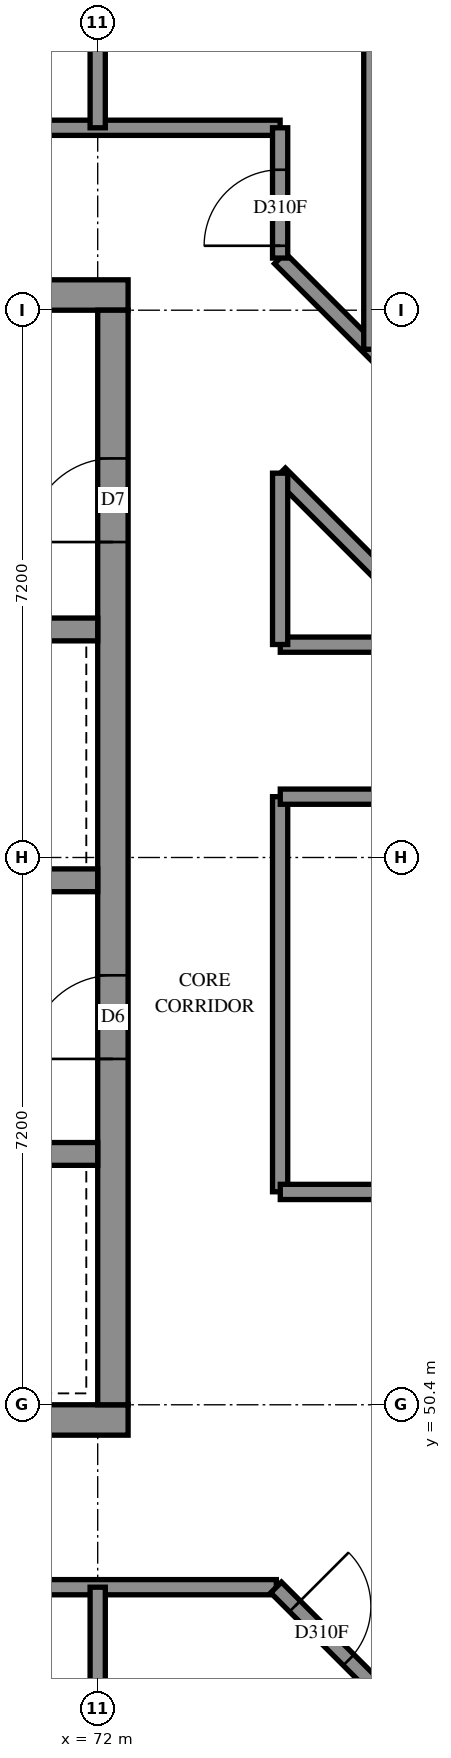
"""IFC4 building model, lengths in metres.
Left out: names, types, materials, properties, quantities, classifications, styles, units other than length and angle.
Written with IfcOpenShell. Run it as: python <this file> out.ifc"""

import sys

from ifc_helpers import new_model, si_unit, direction, frame, frame_2d, origin, place, context, subcontext, project, spatial, rectangle, extrude, element, fill, save


model = new_model("IFC4")
c1 = context("Model", 3, precision=1e-05, world=origin(), true_north=direction((0.0, 1.0)))
c2 = subcontext(c1, "Body", "Model", "MODEL_VIEW")
j1 = project(units=[si_unit("LENGTHUNIT", "METRE"), si_unit("PLANEANGLEUNIT", "RADIAN")], contexts=[c1])
p1 = place(None, origin())
s1 = spatial("IfcSite", under=j1, at=p1, CompositionType="ELEMENT")
p2 = place(p1, origin())
s2 = spatial("IfcBuilding", under=s1, at=p2, CompositionType="ELEMENT")
p3 = place(p2, frame((0.0, 0.0, 257.4)))
s3 = spatial("IfcBuildingStorey", under=s2, at=p3, CompositionType="ELEMENT", Elevation=257.4)
p4 = place(p3, frame((57.2, 50.2, -0.3), z_axis=(0.0, 0.0, 1.0), x_axis=(1.0, 0.0, 0.0)))
e1 = element("IfcWall", 1, at=p4, inside=s3, PredefinedType="SHEAR", context=c2, shape_type="SweptSolid", body=[
    extrude(rectangle(XDim=15.2, YDim=0.4, at=frame_2d((7.6, 0.0))), origin(), (0.0, 0.0, 1.0), 2.7),
])
p5 = place(p3, frame((57.2, 65.0, -0.3), z_axis=(0.0, 0.0, 1.0), x_axis=(1.0, 0.0, 0.0)))
e2 = element("IfcWall", 2, at=p5, inside=s3, PredefinedType="SHEAR", context=c2, shape_type="SweptSolid", body=[
    extrude(rectangle(XDim=15.2, YDim=0.4, at=frame_2d((7.6, 0.0))), origin(), (0.0, 0.0, 1.0), 2.7),
])
p6 = place(p5, frame((10.4, 0.0, 0.3)))
e3 = element("IfcOpeningElement", 3, at=p6, cuts=e2, PredefinedType="OPENING", context=c2, shape_type="SweptSolid", body=[
    extrude(rectangle(XDim=0.8, YDim=2.1, at=frame_2d((0.4, 1.05))), frame((0.0, 0.21, 0.0), z_axis=(0.0, -1.0, 0.0), x_axis=(1.0, 0.0, 0.0)), (0.0, 0.0, 1.0), 0.42),
])
p7 = place(p3, frame((72.2, 50.4, -0.3), z_axis=(0.0, 0.0, 1.0), x_axis=(0.0, 1.0, 0.0)))
e4 = element("IfcWall", 4, at=p7, inside=s3, PredefinedType="SHEAR", context=c2, shape_type="SweptSolid", body=[
    extrude(rectangle(XDim=14.4, YDim=0.4, at=frame_2d((7.2, 0.0))), origin(), (0.0, 0.0, 1.0), 2.7),
])
p8 = place(p7, frame((4.55, 0.0, 0.3)))
e5 = element("IfcOpeningElement", 5, at=p8, cuts=e4, PredefinedType="OPENING", context=c2, shape_type="SweptSolid", body=[
    extrude(rectangle(XDim=1.1, YDim=2.1, at=frame_2d((0.55, 1.05))), frame((0.0, 0.21, 0.0), z_axis=(0.0, -1.0, 0.0), x_axis=(1.0, 0.0, 0.0)), (0.0, 0.0, 1.0), 0.42),
])
p9 = place(p7, frame((11.35, 0.0, 0.3)))
e6 = element("IfcOpeningElement", 6, at=p9, cuts=e4, PredefinedType="OPENING", context=c2, shape_type="SweptSolid", body=[
    extrude(rectangle(XDim=1.1, YDim=2.1, at=frame_2d((0.55, 1.05))), frame((0.0, 0.21, 0.0), z_axis=(0.0, -1.0, 0.0), x_axis=(1.0, 0.0, 0.0)), (0.0, 0.0, 1.0), 0.42),
])
p10 = place(p3, frame((57.6, 53.7, 0.0), z_axis=(0.0, 0.0, 1.0), x_axis=(1.0, 0.0, 0.0)))
e7 = element("IfcWall", 7, at=p10, inside=s3, PredefinedType="SOLIDWALL", context=c2, shape_type="SweptSolid", body=[
    extrude(rectangle(XDim=14.4, YDim=0.3, at=frame_2d((7.2, 0.0))), origin(), (0.0, 0.0, 1.0), 3.1),
])
p11 = place(p10, frame((1.35, 0.0, 0.0)))
e8 = element("IfcOpeningElement", 8, at=p11, cuts=e7, PredefinedType="OPENING", context=c2, shape_type="SweptSolid", body=[
    extrude(rectangle(XDim=0.9, YDim=2.1, at=frame_2d((0.45, 1.05))), frame((0.0, 0.16, 0.0), z_axis=(0.0, -1.0, 0.0), x_axis=(1.0, 0.0, 0.0)), (0.0, 0.0, 1.0), 0.32),
])
p12 = place(p10, frame((4.95, 0.0, 0.0)))
e9 = element("IfcOpeningElement", 9, at=p12, cuts=e7, PredefinedType="OPENING", context=c2, shape_type="SweptSolid", body=[
    extrude(rectangle(XDim=0.9, YDim=2.1, at=frame_2d((0.45, 1.05))), frame((0.0, 0.16, 0.0), z_axis=(0.0, -1.0, 0.0), x_axis=(1.0, 0.0, 0.0)), (0.0, 0.0, 1.0), 0.32),
])
p13 = place(p10, frame((8.55, 0.0, 0.0)))
e10 = element("IfcOpeningElement", 10, at=p13, cuts=e7, PredefinedType="OPENING", context=c2, shape_type="SweptSolid", body=[
    extrude(rectangle(XDim=0.9, YDim=2.1, at=frame_2d((0.45, 1.05))), frame((0.0, 0.16, 0.0), z_axis=(0.0, -1.0, 0.0), x_axis=(1.0, 0.0, 0.0)), (0.0, 0.0, 1.0), 0.32),
])
p14 = place(p10, frame((12.05, 0.0, 0.0)))
e11 = element("IfcOpeningElement", 11, at=p14, cuts=e7, PredefinedType="OPENING", context=c2, shape_type="SweptSolid", body=[
    extrude(rectangle(XDim=1.1, YDim=2.1, at=frame_2d((0.55, 1.05))), frame((0.0, 0.16, 0.0), z_axis=(0.0, -1.0, 0.0), x_axis=(1.0, 0.0, 0.0)), (0.0, 0.0, 1.0), 0.32),
])
p15 = place(p3, frame((57.6, 57.3, 0.0), z_axis=(0.0, 0.0, 1.0), x_axis=(1.0, 0.0, 0.0)))
e12 = element("IfcWall", 12, at=p15, inside=s3, PredefinedType="SOLIDWALL", context=c2, shape_type="SweptSolid", body=[
    extrude(rectangle(XDim=14.4, YDim=0.3, at=frame_2d((7.2, 0.0))), origin(), (0.0, 0.0, 1.0), 3.1),
])
p16 = place(p15, frame((8.55, 0.0, 0.0)))
e13 = element("IfcOpeningElement", 13, at=p16, cuts=e12, PredefinedType="OPENING", context=c2, shape_type="SweptSolid", body=[
    extrude(rectangle(XDim=0.9, YDim=2.1, at=frame_2d((0.45, 1.05))), frame((0.0, 0.16, 0.0), z_axis=(0.0, -1.0, 0.0), x_axis=(1.0, 0.0, 0.0)), (0.0, 0.0, 1.0), 0.32),
])
p17 = place(p15, frame((1.25, 0.0, 0.0)))
e14 = element("IfcOpeningElement", 14, at=p17, cuts=e12, PredefinedType="OPENING", context=c2, shape_type="SweptSolid", body=[
    extrude(rectangle(XDim=1.1, YDim=2.1, at=frame_2d((0.55, 1.05))), frame((0.0, 0.16, 0.0), z_axis=(0.0, -1.0, 0.0), x_axis=(1.0, 0.0, 0.0)), (0.0, 0.0, 1.0), 0.32),
])
p18 = place(p15, frame((4.85, 0.0, 0.0)))
e15 = element("IfcOpeningElement", 15, at=p18, cuts=e12, PredefinedType="OPENING", context=c2, shape_type="SweptSolid", body=[
    extrude(rectangle(XDim=1.1, YDim=2.1, at=frame_2d((0.55, 1.05))), frame((0.0, 0.16, 0.0), z_axis=(0.0, -1.0, 0.0), x_axis=(1.0, 0.0, 0.0)), (0.0, 0.0, 1.0), 0.32),
])
p19 = place(p15, frame((12.05, 0.0, 0.0)))
e16 = element("IfcOpeningElement", 16, at=p19, cuts=e12, PredefinedType="OPENING", context=c2, shape_type="SweptSolid", body=[
    extrude(rectangle(XDim=1.1, YDim=2.1, at=frame_2d((0.55, 1.05))), frame((0.0, 0.16, 0.0), z_axis=(0.0, -1.0, 0.0), x_axis=(1.0, 0.0, 0.0)), (0.0, 0.0, 1.0), 0.32),
])
p20 = place(p3, frame((64.8, 60.6, 0.0), z_axis=(0.0, 0.0, 1.0), x_axis=(1.0, 0.0, 0.0)))
e17 = element("IfcWall", 17, at=p20, inside=s3, PredefinedType="SOLIDWALL", context=c2, shape_type="SweptSolid", body=[
    extrude(rectangle(XDim=7.2, YDim=0.3, at=frame_2d((3.6, 0.0))), origin(), (0.0, 0.0, 1.0), 3.1),
])
p21 = place(p3, frame((55.2, 67.2, 0.0), z_axis=(0.0, 0.0, 1.0), x_axis=(1.0, 0.0, 0.0)))
e18 = element("IfcWall", 18, at=p21, inside=s3, PredefinedType="PARTITIONING", context=c2, shape_type="SweptSolid", body=[
    extrude(rectangle(XDim=19.2, YDim=0.2, at=frame_2d((9.6, 0.0))), origin(), (0.0, 0.0, 1.0), 3.1),
])
p22 = place(p21, frame((4.475, 0.0, 0.0)))
e19 = element("IfcOpeningElement", 19, at=p22, cuts=e18, PredefinedType="OPENING", context=c2, shape_type="SweptSolid", body=[
    extrude(rectangle(XDim=1.0, YDim=2.1, at=frame_2d((0.5, 1.05))), frame((0.0, 0.11, 0.0), z_axis=(0.0, -1.0, 0.0), x_axis=(1.0, 0.0, 0.0)), (0.0, 0.0, 1.0), 0.22),
])
p23 = place(p21, frame((8.301, 0.0, 0.0)))
e20 = element("IfcOpeningElement", 20, at=p23, cuts=e18, PredefinedType="OPENING", context=c2, shape_type="SweptSolid", body=[
    extrude(rectangle(XDim=0.9, YDim=2.1, at=frame_2d((0.45, 1.05))), frame((0.0, 0.11, 0.0), z_axis=(0.0, -1.0, 0.0), x_axis=(1.0, 0.0, 0.0)), (0.0, 0.0, 1.0), 0.22),
])
p24 = place(p21, frame((13.88, 0.0, 0.0)))
e21 = element("IfcOpeningElement", 21, at=p24, cuts=e18, PredefinedType="OPENING", context=c2, shape_type="SweptSolid", body=[
    extrude(rectangle(XDim=1.0, YDim=2.1, at=frame_2d((0.5, 1.05))), frame((0.0, 0.11, 0.0), z_axis=(0.0, -1.0, 0.0), x_axis=(1.0, 0.0, 0.0)), (0.0, 0.0, 1.0), 0.22),
])
p25 = place(p3, frame((55.2, 48.0, 0.0), z_axis=(0.0, 0.0, 1.0), x_axis=(1.0, 0.0, 0.0)))
e22 = element("IfcWall", 22, at=p25, inside=s3, PredefinedType="PARTITIONING", context=c2, shape_type="SweptSolid", body=[
    extrude(rectangle(XDim=19.15, YDim=0.2, at=frame_2d((9.575, 0.0))), origin(), (0.0, 0.0, 1.0), 3.1),
])
p26 = place(p25, frame((6.343, 0.0, 0.0)))
e23 = element("IfcOpeningElement", 23, at=p26, cuts=e22, PredefinedType="OPENING", context=c2, shape_type="SweptSolid", body=[
    extrude(rectangle(XDim=0.9, YDim=2.1, at=frame_2d((0.45, 1.05))), frame((0.0, 0.11, 0.0), z_axis=(0.0, -1.0, 0.0), x_axis=(1.0, 0.0, 0.0)), (0.0, 0.0, 1.0), 0.22),
])
p27 = place(p25, frame((11.633, 0.0, 0.0)))
e24 = element("IfcOpeningElement", 24, at=p27, cuts=e22, PredefinedType="OPENING", context=c2, shape_type="SweptSolid", body=[
    extrude(rectangle(XDim=1.0, YDim=2.1, at=frame_2d((0.5, 1.05))), frame((0.0, 0.11, 0.0), z_axis=(0.0, -1.0, 0.0), x_axis=(1.0, 0.0, 0.0)), (0.0, 0.0, 1.0), 0.22),
])
p28 = place(p25, frame((13.707, 0.0, 0.0)))
e25 = element("IfcOpeningElement", 25, at=p28, cuts=e22, PredefinedType="OPENING", context=c2, shape_type="SweptSolid", body=[
    extrude(rectangle(XDim=1.0, YDim=2.1, at=frame_2d((0.5, 1.05))), frame((0.0, 0.11, 0.0), z_axis=(0.0, -1.0, 0.0), x_axis=(1.0, 0.0, 0.0)), (0.0, 0.0, 1.0), 0.22),
])
p29 = place(p3, frame((74.397, 65.483, 0.0), z_axis=(0.0, 0.0, 1.0), x_axis=(0.7071067812, -0.7071067812, 0.0)))
e26 = element("IfcWall", 26, at=p29, inside=s3, PredefinedType="PARTITIONING", context=c2, shape_type="SweptSolid", body=[
    extrude(rectangle(XDim=10.788, YDim=0.2, at=frame_2d((5.394, 0.0))), origin(), (0.0, 0.0, 1.0), 3.1),
])
p30 = place(p29, frame((5.083, 0.0, 0.0)))
e27 = element("IfcOpeningElement", 27, at=p30, cuts=e26, PredefinedType="OPENING", context=c2, shape_type="SweptSolid", body=[
    extrude(rectangle(XDim=1.0, YDim=2.1, at=frame_2d((0.5, 1.05))), frame((0.0, 0.11, 0.0), z_axis=(0.0, -1.0, 0.0), x_axis=(1.0, 0.0, 0.0)), (0.0, 0.0, 1.0), 0.22),
])
p31 = place(p29, frame((7.858, 0.0, 0.0)))
e28 = element("IfcOpeningElement", 28, at=p31, cuts=e26, PredefinedType="OPENING", context=c2, shape_type="SweptSolid", body=[
    extrude(rectangle(XDim=1.0, YDim=2.1, at=frame_2d((0.5, 1.05))), frame((0.0, 0.11, 0.0), z_axis=(0.0, -1.0, 0.0), x_axis=(1.0, 0.0, 0.0)), (0.0, 0.0, 1.0), 0.22),
])
p32 = place(p3, frame((75.6, 64.286, 0.0), z_axis=(0.0, 0.0, 1.0), x_axis=(0.0, 1.0, 0.0)))
e29 = element("IfcWall", 29, at=p32, inside=s3, PredefinedType="PARTITIONING", context=c2, shape_type="SweptSolid", body=[
    extrude(rectangle(XDim=8.538, YDim=0.2, at=frame_2d((4.269, 0.0))), origin(), (0.0, 0.0, 1.0), 3.1),
])
p33 = place(p3, frame((74.4, 53.202, 0.0), z_axis=(0.0, 0.0, 1.0), x_axis=(0.0, 1.0, 0.0)))
e30 = element("IfcWall", 30, at=p33, inside=s3, PredefinedType="PARTITIONING", context=c2, shape_type="SweptSolid", body=[
    extrude(rectangle(XDim=5.198, YDim=0.2, at=frame_2d((2.599, 0.0))), origin(), (0.0, 0.0, 1.0), 3.1),
])
p34 = place(p3, frame((74.347, 47.997, 0.0), z_axis=(0.0, 0.0, 1.0), x_axis=(0.7071067812, -0.7071067812, 0.0)))
e31 = element("IfcWall", 31, at=p34, inside=s3, PredefinedType="PARTITIONING", context=c2, shape_type="SweptSolid", body=[
    extrude(rectangle(XDim=4.596, YDim=0.2, at=frame_2d((2.298, 0.0))), origin(), (0.0, 0.0, 1.0), 3.1),
])
p35 = place(p34, frame((0.35, 0.0, 0.0)))
e32 = element("IfcOpeningElement", 32, at=p35, cuts=e31, PredefinedType="OPENING", context=c2, shape_type="SweptSolid", body=[
    extrude(rectangle(XDim=1.0, YDim=2.1, at=frame_2d((0.5, 1.05))), frame((0.0, 0.11, 0.0), z_axis=(0.0, -1.0, 0.0), x_axis=(1.0, 0.0, 0.0)), (0.0, 0.0, 1.0), 0.22),
])
p36 = place(p3, frame((72.0, 43.55, 0.0), z_axis=(0.0, 0.0, 1.0), x_axis=(0.0, 1.0, 0.0)))
e33 = element("IfcWall", 33, at=p36, inside=s3, PredefinedType="PARTITIONING", context=c2, shape_type="SweptSolid", body=[
    extrude(rectangle(XDim=4.45, YDim=0.2, at=frame_2d((2.225, 0.0))), origin(), (0.0, 0.0, 1.0), 3.1),
])
p37 = place(p3, frame((72.0, 67.2, 0.0), z_axis=(0.0, 0.0, 1.0), x_axis=(0.0, 1.0, 0.0)))
e34 = element("IfcWall", 34, at=p37, inside=s3, PredefinedType="PARTITIONING", context=c2, shape_type="SweptSolid", body=[
    extrude(rectangle(XDim=4.346, YDim=0.2, at=frame_2d((2.173, 0.0))), origin(), (0.0, 0.0, 1.0), 3.1),
])
p38 = place(p3, frame((74.402, 58.4, 0.0), z_axis=(0.0, 0.0, 1.0), x_axis=(1.0, 0.0, 0.0)))
e35 = element("IfcWall", 35, at=p38, inside=s3, PredefinedType="PARTITIONING", context=c2, shape_type="SweptSolid", body=[
    extrude(rectangle(XDim=4.256, YDim=0.2, at=frame_2d((2.128, 0.0))), origin(), (0.0, 0.0, 1.0), 3.1),
])
p39 = place(p38, frame((1.331, 0.0, 0.0)))
e36 = element("IfcOpeningElement", 36, at=p39, cuts=e35, PredefinedType="OPENING", context=c2, shape_type="SweptSolid", body=[
    extrude(rectangle(XDim=1.0, YDim=2.1, at=frame_2d((0.5, 1.05))), frame((0.0, 0.11, 0.0), z_axis=(0.0, -1.0, 0.0), x_axis=(1.0, 0.0, 0.0)), (0.0, 0.0, 1.0), 0.22),
])
p40 = place(p3, frame((74.399, 62.653, 0.0), z_axis=(0.0, 0.0, 1.0), x_axis=(0.7071067812, -0.7071067812, 0.0)))
e37 = element("IfcWall", 37, at=p40, inside=s3, PredefinedType="PARTITIONING", context=c2, shape_type="SweptSolid", body=[
    extrude(rectangle(XDim=3.188, YDim=0.2, at=frame_2d((1.594, 0.0))), origin(), (0.0, 0.0, 1.0), 3.1),
])
p41 = place(p3, frame((74.402, 53.2, 0.0), z_axis=(0.0, 0.0, 1.0), x_axis=(1.0, 0.0, 0.0)))
e38 = element("IfcWall", 38, at=p41, inside=s3, PredefinedType="PARTITIONING", context=c2, shape_type="SweptSolid", body=[
    extrude(rectangle(XDim=2.968, YDim=0.2, at=frame_2d((1.484, 0.0))), origin(), (0.0, 0.0, 1.0), 3.1),
])
for number, where, z_axis, x_axis in (
    (39, (74.402, 60.4, 0.0), (0.0, 0.0, 1.0), (1.0, 0.0, 0.0)),
    (40, (74.4, 60.402, 0.0), (0.0, 0.0, 1.0), (0.0, 1.0, 0.0)),
):
    element("IfcWall", number, at=place(p3, frame(where, z_axis=z_axis, x_axis=x_axis)), inside=s3, PredefinedType="PARTITIONING", context=c2, shape_type="SweptSolid", body=[
        extrude(rectangle(XDim=2.254, YDim=0.2, at=frame_2d((1.127, 0.0))), origin(), (0.0, 0.0, 1.0), 3.1),
    ])
p42 = place(p3, frame((74.4, 65.486, 0.0), z_axis=(0.0, 0.0, 1.0), x_axis=(0.0, 1.0, 0.0)))
e41 = element("IfcWall", 41, at=p42, inside=s3, PredefinedType="PARTITIONING", context=c2, shape_type="SweptSolid", body=[
    extrude(rectangle(XDim=1.714, YDim=0.2, at=frame_2d((0.857, 0.0))), origin(), (0.0, 0.0, 1.0), 3.1),
])
p43 = place(p42, frame((0.162, 0.0, 0.0)))
e42 = element("IfcOpeningElement", 42, at=p43, cuts=e41, PredefinedType="OPENING", context=c2, shape_type="SweptSolid", body=[
    extrude(rectangle(XDim=1.0, YDim=2.1, at=frame_2d((0.5, 1.05))), frame((0.0, 0.11, 0.0), z_axis=(0.0, -1.0, 0.0), x_axis=(1.0, 0.0, 0.0)), (0.0, 0.0, 1.0), 0.22),
])
p44 = place(p8, origin())
e43 = element("IfcDoor", 43, at=p44, inside=s3, OperationType="DOUBLE_DOOR_SINGLE_SWING", PredefinedType="DOOR", context=c2, shape_type="SweptSolid", body=[
    extrude(rectangle(XDim=1.1, YDim=2.1, at=frame_2d((0.55, 1.05))), frame((0.0, 0.025, 0.0), z_axis=(0.0, -1.0, 0.0), x_axis=(1.0, 0.0, 0.0)), (0.0, 0.0, 1.0), 0.05),
])
fill(e5, e43)
p45 = place(p9, origin())
e44 = element("IfcDoor", 44, at=p45, inside=s3, OperationType="SINGLE_SWING_RIGHT", PredefinedType="DOOR", context=c2, shape_type="SweptSolid", body=[
    extrude(rectangle(XDim=1.1, YDim=2.1, at=frame_2d((0.55, 1.05))), frame((0.0, 0.025, 0.0), z_axis=(0.0, -1.0, 0.0), x_axis=(1.0, 0.0, 0.0)), (0.0, 0.0, 1.0), 0.05),
])
fill(e6, e44)
p46 = place(p35, origin())
e45 = element("IfcDoor", 45, at=p46, inside=s3, OperationType="SINGLE_SWING_LEFT", PredefinedType="DOOR", context=c2, shape_type="SweptSolid", body=[
    extrude(rectangle(XDim=1.0, YDim=2.1, at=frame_2d((0.5, 1.05))), frame((0.0, 0.025, 0.0), z_axis=(0.0, -1.0, 0.0), x_axis=(1.0, 0.0, 0.0)), (0.0, 0.0, 1.0), 0.05),
])
fill(e32, e45)
p47 = place(p43, origin())
e46 = element("IfcDoor", 46, at=p47, inside=s3, OperationType="SINGLE_SWING_RIGHT", PredefinedType="DOOR", context=c2, shape_type="SweptSolid", body=[
    extrude(rectangle(XDim=1.0, YDim=2.1, at=frame_2d((0.5, 1.05))), frame((0.0, 0.025, 0.0), z_axis=(0.0, -1.0, 0.0), x_axis=(1.0, 0.0, 0.0)), (0.0, 0.0, 1.0), 0.05),
])
fill(e42, e46)
save(model, sys.argv[1])
